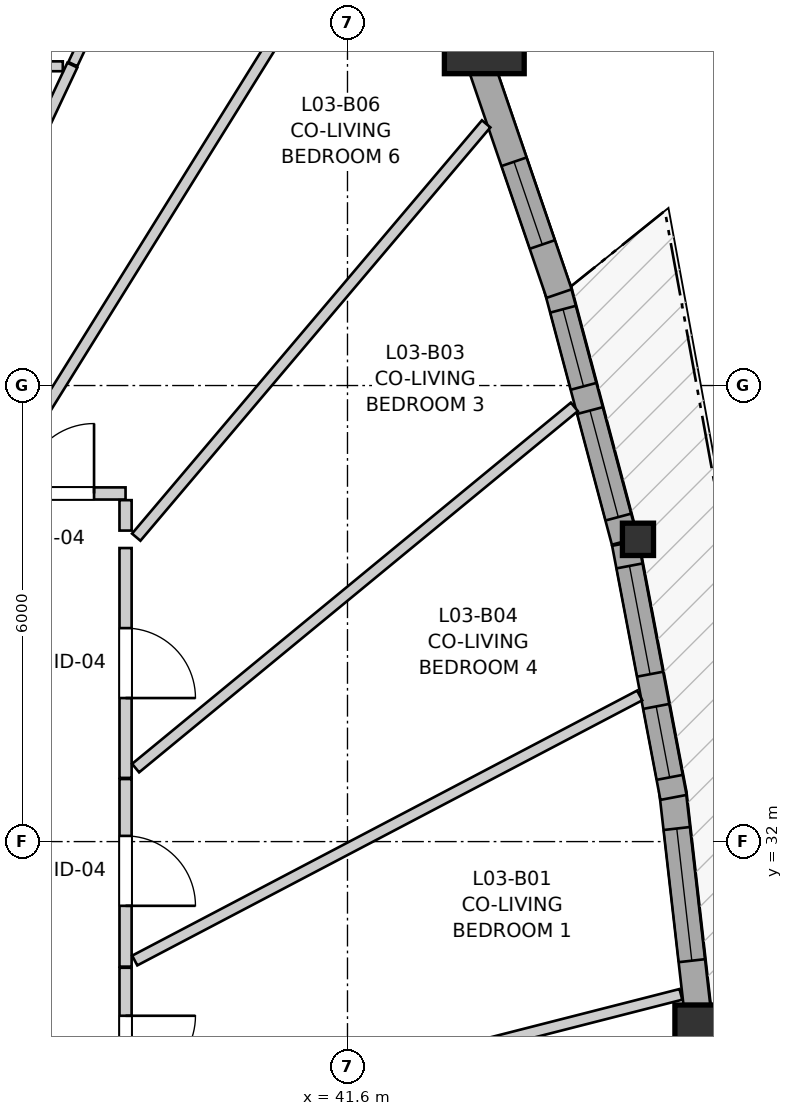
"""IFC4 building model, lengths in metres.
Left out: names, types, materials, properties, quantities, classifications, styles, units other than length and angle.
Written with IfcOpenShell. Run it as: python <this file> out.ifc"""

import sys

from ifc_helpers import new_model, si_unit, direction, frame, frame_2d, origin, origin_2d, place, context, subcontext, project, spatial, rectangle, i_section, extrude, source, transform, mapped, element, fill, save


model = new_model("IFC4")
c1 = context("Model", 3, precision=1e-05, world=origin(), true_north=direction((0.0, 1.0)))
c2 = subcontext(c1, "Body", "Model", "MODEL_VIEW")
j1 = project(units=[si_unit("LENGTHUNIT", "METRE"), si_unit("PLANEANGLEUNIT", "RADIAN")], contexts=[c1])
p1 = place(None, origin())
s1 = spatial("IfcSite", under=j1, at=p1, CompositionType="ELEMENT")
p2 = place(p1, origin())
s2 = spatial("IfcBuilding", under=s1, at=p2, CompositionType="ELEMENT")
p3 = place(p2, frame((0.0, 0.0, 14.2)))
s3 = spatial("IfcBuildingStorey", under=s2, at=p3, CompositionType="ELEMENT", Elevation=14.2)
m1 = source(origin(), c2, "Body", "SweptSolid", [
    extrude(rectangle(XDim=1.05, YDim=1.05, at=origin_2d()), origin(), (0.0, 0.0, 1.0), 2.94),
])
p4 = place(p3, frame((46.433, 29.325, 0.0), z_axis=(0.0, 0.0, 1.0), x_axis=(1.0, 0.0, 0.0)))
e1 = element("IfcColumn", 1, at=p4, inside=s3, PredefinedType="COLUMN", context=c2, shape_type="MappedRepresentation", body=[
    mapped(m1, transform((0.0, 0.0, 0.0), x_axis=(1.0, 0.0, 0.0), y_axis=(0.0, 1.0, 0.0), z_axis=(0.0, 0.0, 1.0), scale=1.0)),
])
m2 = source(origin(), c2, "Body", "SweptSolid", [
    extrude(i_section(OverallWidth=0.409, OverallDepth=0.425, WebThickness=0.03, FlangeThickness=0.048, FilletRadius=0.015, at=origin_2d()), origin(), (0.0, 0.0, 1.0), 2.94),
])
p5 = place(p3, frame((45.422, 35.977, 0.0), z_axis=(0.0, 0.0, 1.0), x_axis=(1.0, 0.0, 0.0)))
e2 = element("IfcColumn", 2, at=p5, inside=s3, PredefinedType="PILASTER", context=c2, shape_type="MappedRepresentation", body=[
    mapped(m2, transform((0.0, 0.0, 0.0), x_axis=(1.0, 0.0, 0.0), y_axis=(0.0, 1.0, 0.0), z_axis=(0.0, 0.0, 1.0), scale=1.0)),
])
p6 = place(p3, frame((43.4, 42.628, 0.0), z_axis=(0.0, 0.0, 1.0), x_axis=(1.0, 0.0, 0.0)))
e3 = element("IfcColumn", 3, at=p6, inside=s3, PredefinedType="COLUMN", context=c2, shape_type="MappedRepresentation", body=[
    mapped(m1, transform((0.0, 0.0, 0.0), x_axis=(1.0, 0.0, 0.0), y_axis=(0.0, 1.0, 0.0), z_axis=(0.0, 0.0, 1.0), scale=1.0)),
])
p7 = place(p3, frame((46.225, 29.604, 0.0), z_axis=(0.0, 0.0, 1.0), x_axis=(-0.113323399269, 0.993558154905, 0.0)))
e4 = element("IfcWall", 4, at=p7, inside=s3, PredefinedType="SOLIDWALL", context=c2, shape_type="SweptSolid", body=[
    extrude(rectangle(XDim=3.085, YDim=0.35, at=frame_2d((1.542, 0.0))), origin(), (0.0, 0.0, 1.0), 2.42),
])
p8 = place(p7, frame((0.835, 0.0, 0.82)))
e5 = element("IfcOpeningElement", 5, at=p8, cuts=e4, PredefinedType="OPENING", context=c2, shape_type="SweptSolid", body=[
    extrude(rectangle(XDim=1.75, YDim=1.3, at=frame_2d((0.875, 0.65))), frame((0.0, 0.185, 0.0), z_axis=(0.0, -1.0, 0.0), x_axis=(1.0, 0.0, 0.0)), (0.0, 0.0, 1.0), 0.37),
])
p9 = place(p3, frame((45.889, 32.581, 0.0), z_axis=(0.0, 0.0, 1.0), x_axis=(-0.186670339622, 0.98242260983, 0.0)))
e6 = element("IfcWall", 6, at=p9, inside=s3, PredefinedType="SOLIDWALL", context=c2, shape_type="SweptSolid", body=[
    extrude(rectangle(XDim=3.403, YDim=0.35, at=frame_2d((1.702, 0.0))), origin(), (0.0, 0.0, 1.0), 2.42),
])
p10 = place(p9, frame((0.269, 0.0, 0.82)))
e7 = element("IfcOpeningElement", 7, at=p10, cuts=e6, PredefinedType="OPENING", context=c2, shape_type="SweptSolid", body=[
    extrude(rectangle(XDim=0.95, YDim=1.35, at=frame_2d((0.475, 0.675))), frame((0.0, 0.185, 0.0), z_axis=(0.0, -1.0, 0.0), x_axis=(1.0, 0.0, 0.0)), (0.0, 0.0, 1.0), 0.37),
])
p11 = place(p9, frame((1.65, 0.0, 0.82)))
e8 = element("IfcOpeningElement", 8, at=p11, cuts=e6, PredefinedType="OPENING", context=c2, shape_type="SweptSolid", body=[
    extrude(rectangle(XDim=1.45, YDim=1.25, at=frame_2d((0.725, 0.625))), frame((0.0, 0.185, 0.0), z_axis=(0.0, -1.0, 0.0), x_axis=(1.0, 0.0, 0.0)), (0.0, 0.0, 1.0), 0.37),
])
p12 = place(p3, frame((45.248, 35.951, 0.0), z_axis=(0.0, 0.0, 1.0), x_axis=(-0.25703883136, 0.966401075731, 0.0)))
e9 = element("IfcWall", 9, at=p12, inside=s3, PredefinedType="SOLIDWALL", context=c2, shape_type="SweptSolid", body=[
    extrude(rectangle(XDim=3.459, YDim=0.35, at=frame_2d((1.729, 0.0))), origin(), (0.0, 0.0, 1.0), 2.42),
])
p13 = place(p12, frame((0.329, 0.0, 0.82)))
e10 = element("IfcOpeningElement", 10, at=p13, cuts=e9, PredefinedType="OPENING", context=c2, shape_type="SweptSolid", body=[
    extrude(rectangle(XDim=1.45, YDim=1.25, at=frame_2d((0.725, 0.625))), frame((0.0, 0.185, 0.0), z_axis=(0.0, -1.0, 0.0), x_axis=(1.0, 0.0, 0.0)), (0.0, 0.0, 1.0), 0.37),
])
p14 = place(p12, frame((2.109, 0.0, 0.82)))
e11 = element("IfcOpeningElement", 11, at=p14, cuts=e9, PredefinedType="OPENING", context=c2, shape_type="SweptSolid", body=[
    extrude(rectangle(XDim=1.05, YDim=1.45, at=frame_2d((0.525, 0.725))), frame((0.0, 0.185, 0.0), z_axis=(0.0, -1.0, 0.0), x_axis=(1.0, 0.0, 0.0)), (0.0, 0.0, 1.0), 0.37),
])
p15 = place(p3, frame((44.384, 39.21, 0.0), z_axis=(0.0, 0.0, 1.0), x_axis=(-0.323604561993, 0.946192415663, 0.0)))
e12 = element("IfcWall", 12, at=p15, inside=s3, PredefinedType="SOLIDWALL", context=c2, shape_type="SweptSolid", body=[
    extrude(rectangle(XDim=3.252, YDim=0.35, at=frame_2d((1.626, 0.0))), origin(), (0.0, 0.0, 1.0), 2.42),
])
p16 = place(p15, frame((0.683, 0.0, 0.82)))
e13 = element("IfcOpeningElement", 13, at=p16, cuts=e12, PredefinedType="OPENING", context=c2, shape_type="SweptSolid", body=[
    extrude(rectangle(XDim=1.15, YDim=1.2, at=frame_2d((0.575, 0.6))), frame((0.0, 0.185, 0.0), z_axis=(0.0, -1.0, 0.0), x_axis=(1.0, 0.0, 0.0)), (0.0, 0.0, 1.0), 0.37),
])
p17 = place(p3, frame((38.68, 35.862, 0.0), z_axis=(0.0, 0.0, 1.0), x_axis=(0.0, -1.0, 0.0)))
e14 = element("IfcWall", 14, at=p17, inside=s3, PredefinedType="PARTITIONING", context=c2, shape_type="SweptSolid", body=[
    extrude(rectangle(XDim=3.024, YDim=0.16, at=frame_2d((1.512, 0.0))), origin(), (0.0, 0.0, 1.0), 2.94),
])
p18 = place(p17, frame((1.053, 0.0, 0.0)))
e15 = element("IfcOpeningElement", 15, at=p18, cuts=e14, PredefinedType="OPENING", context=c2, shape_type="SweptSolid", body=[
    extrude(rectangle(XDim=0.92, YDim=2.1, at=frame_2d((0.46, 1.05))), frame((0.0, 0.09, 0.0), z_axis=(0.0, -1.0, 0.0), x_axis=(1.0, 0.0, 0.0)), (0.0, 0.0, 1.0), 0.18),
])
p19 = place(p3, frame((38.68, 32.823, 0.0), z_axis=(0.0, 0.0, 1.0), x_axis=(0.0, -1.0, 0.0)))
e16 = element("IfcWall", 16, at=p19, inside=s3, PredefinedType="PARTITIONING", context=c2, shape_type="SweptSolid", body=[
    extrude(rectangle(XDim=2.468, YDim=0.16, at=frame_2d((1.234, 0.0))), origin(), (0.0, 0.0, 1.0), 2.94),
])
p20 = place(p19, frame((0.748, 0.0, 0.0)))
e17 = element("IfcOpeningElement", 17, at=p20, cuts=e16, PredefinedType="OPENING", context=c2, shape_type="SweptSolid", body=[
    extrude(rectangle(XDim=0.92, YDim=2.1, at=frame_2d((0.46, 1.05))), frame((0.0, 0.09, 0.0), z_axis=(0.0, -1.0, 0.0), x_axis=(1.0, 0.0, 0.0)), (0.0, 0.0, 1.0), 0.18),
])
p21 = place(p3, frame((38.68, 30.34, 0.0), z_axis=(0.0, 0.0, 1.0), x_axis=(0.0, -1.0, 0.0)))
e18 = element("IfcWall", 18, at=p21, inside=s3, PredefinedType="PARTITIONING", context=c2, shape_type="SweptSolid", body=[
    extrude(rectangle(XDim=2.23, YDim=0.16, at=frame_2d((1.115, 0.0))), origin(), (0.0, 0.0, 1.0), 2.94),
])
p22 = place(p21, frame((0.632, 0.0, 0.0)))
e19 = element("IfcOpeningElement", 19, at=p22, cuts=e18, PredefinedType="OPENING", context=c2, shape_type="SweptSolid", body=[
    extrude(rectangle(XDim=0.92, YDim=2.1, at=frame_2d((0.46, 1.05))), frame((0.0, 0.09, 0.0), z_axis=(0.0, -1.0, 0.0), x_axis=(1.0, 0.0, 0.0)), (0.0, 0.0, 1.0), 0.18),
])
p23 = place(p3, frame((36.913, 36.58, 0.0), z_axis=(0.0, 0.0, 1.0), x_axis=(1.0, 0.0, 0.0)))
e20 = element("IfcWall", 20, at=p23, inside=s3, PredefinedType="PARTITIONING", context=c2, shape_type="SweptSolid", body=[
    extrude(rectangle(XDim=1.767, YDim=0.16, at=frame_2d((0.883, 0.0))), origin(), (0.0, 0.0, 1.0), 2.94),
])
p24 = place(p23, frame((0.433, 0.0, 0.0)))
e21 = element("IfcOpeningElement", 21, at=p24, cuts=e20, PredefinedType="OPENING", context=c2, shape_type="SweptSolid", body=[
    extrude(rectangle(XDim=0.92, YDim=2.1, at=frame_2d((0.46, 1.05))), frame((0.0, 0.09, 0.0), z_axis=(0.0, -1.0, 0.0), x_axis=(1.0, 0.0, 0.0)), (0.0, 0.0, 1.0), 0.18),
])
p25 = place(p3, frame((37.009, 36.705, 0.0), z_axis=(0.0, 0.0, 1.0), x_axis=(0.528183829193, 0.849130050451, 0.0)))
e22 = element("IfcWall", 22, at=p25, inside=s3, PredefinedType="PARTITIONING", context=c2, shape_type="SweptSolid", body=[
    extrude(rectangle(XDim=10.005, YDim=0.145, at=frame_2d((5.003, 0.0))), origin(), (0.0, 0.0, 1.0), 2.94),
])
p26 = place(p3, frame((38.812, 32.967, 0.0), z_axis=(0.0, 0.0, 1.0), x_axis=(0.772048037558, 0.635564180633, 0.0)))
e23 = element("IfcWall", 23, at=p26, inside=s3, PredefinedType="PARTITIONING", context=c2, shape_type="SweptSolid", body=[
    extrude(rectangle(XDim=7.477, YDim=0.145, at=frame_2d((3.739, 0.0))), origin(), (0.0, 0.0, 1.0), 2.94),
])
p27 = place(p3, frame((38.801, 30.435, 0.0), z_axis=(0.0, 0.0, 1.0), x_axis=(0.885428701358, 0.46477523042, 0.0)))
e24 = element("IfcWall", 24, at=p27, inside=s3, PredefinedType="PARTITIONING", context=c2, shape_type="SweptSolid", body=[
    extrude(rectangle(XDim=7.503, YDim=0.145, at=frame_2d((3.751, 0.0))), origin(), (0.0, 0.0, 1.0), 2.94),
])
p28 = place(p3, frame((38.786, 28.152, 0.0), z_axis=(0.0, 0.0, 1.0), x_axis=(0.968940490632, 0.247294006424, 0.0)))
e25 = element("IfcWall", 25, at=p28, inside=s3, PredefinedType="PARTITIONING", context=c2, shape_type="SweptSolid", body=[
    extrude(rectangle(XDim=7.432, YDim=0.145, at=frame_2d((3.716, 0.0))), origin(), (0.0, 0.0, 1.0), 2.94),
])
p29 = place(p3, frame((38.821, 36.005, 0.0), z_axis=(0.0, 0.0, 1.0), x_axis=(0.646174151972, 0.76318999294, 0.0)))
e26 = element("IfcWall", 26, at=p29, inside=s3, PredefinedType="PARTITIONING", context=c2, shape_type="SweptSolid", body=[
    extrude(rectangle(XDim=7.125, YDim=0.145, at=frame_2d((3.562, 0.0))), origin(), (0.0, 0.0, 1.0), 2.94),
])
p30 = place(p3, frame((35.385, 36.698, 0.0), z_axis=(0.0, 0.0, 1.0), x_axis=(0.425687116038, 0.904870421242, 0.0)))
e27 = element("IfcWall", 27, at=p30, inside=s3, PredefinedType="PARTITIONING", context=c2, shape_type="SweptSolid", body=[
    extrude(rectangle(XDim=6.097, YDim=0.145, at=frame_2d((3.049, 0.0))), origin(), (0.0, 0.0, 1.0), 2.94),
])
p31 = place(p3, frame((37.987, 42.229, 0.0), z_axis=(0.0, 0.0, 1.0), x_axis=(0.425771690569, 0.904830629184, 0.0)))
e28 = element("IfcWall", 28, at=p31, inside=s3, PredefinedType="PARTITIONING", context=c2, shape_type="SweptSolid", body=[
    extrude(rectangle(XDim=1.855, YDim=0.13, at=frame_2d((0.928, 0.0))), origin(), (0.0, 0.0, 1.0), 2.94),
])
p32 = place(p3, frame((37.071, 42.2, 0.0), z_axis=(0.0, 0.0, 1.0), x_axis=(1.0, 0.0, 0.0)))
e29 = element("IfcWall", 29, at=p32, inside=s3, PredefinedType="PARTITIONING", context=c2, shape_type="SweptSolid", body=[
    extrude(rectangle(XDim=0.783, YDim=0.13, at=frame_2d((0.392, 0.0))), origin(), (0.0, 0.0, 1.0), 2.94),
])
p33 = place(p3, frame((38.68, 36.092, 0.0), z_axis=(0.0, 0.0, 1.0), x_axis=(0.0, 1.0, 0.0)))
e30 = element("IfcWall", 30, at=p33, inside=s3, PredefinedType="PARTITIONING", context=c2, shape_type="SweptSolid", body=[
    extrude(rectangle(XDim=0.4, YDim=0.16, at=frame_2d((0.2, 0.0))), origin(), (0.0, 0.0, 1.0), 2.94),
])
m3 = source(origin(), c2, "Body", "SweptSolid", [
    extrude(rectangle(XDim=1.75, YDim=1.3, at=frame_2d((0.875, 0.65))), frame((0.0, 0.03, 0.0), z_axis=(0.0, -1.0, 0.0), x_axis=(1.0, 0.0, 0.0)), (0.0, 0.0, 1.0), 0.06),
])
p34 = place(p8, origin())
e31 = element("IfcWindow", 31, at=p34, inside=s3, PartitioningType="SINGLE_PANEL", PredefinedType="WINDOW", context=c2, shape_type="MappedRepresentation", body=[
    mapped(m3, transform((0.0, 0.0, 0.0), x_axis=(1.0, 0.0, 0.0), y_axis=(0.0, 1.0, 0.0), z_axis=(0.0, 0.0, 1.0), scale=1.0)),
])
fill(e5, e31)
m4 = source(origin(), c2, "Body", "SweptSolid", [
    extrude(rectangle(XDim=0.95, YDim=1.35, at=frame_2d((0.475, 0.675))), frame((0.0, 0.03, 0.0), z_axis=(0.0, -1.0, 0.0), x_axis=(1.0, 0.0, 0.0)), (0.0, 0.0, 1.0), 0.06),
])
p35 = place(p10, origin())
e32 = element("IfcWindow", 32, at=p35, inside=s3, PartitioningType="SINGLE_PANEL", PredefinedType="WINDOW", context=c2, shape_type="MappedRepresentation", body=[
    mapped(m4, transform((0.0, 0.0, 0.0), x_axis=(1.0, 0.0, 0.0), y_axis=(0.0, 1.0, 0.0), z_axis=(0.0, 0.0, 1.0), scale=1.0)),
])
fill(e7, e32)
m5 = source(origin(), c2, "Body", "SweptSolid", [
    extrude(rectangle(XDim=1.45, YDim=1.25, at=frame_2d((0.725, 0.625))), frame((0.0, 0.03, 0.0), z_axis=(0.0, -1.0, 0.0), x_axis=(1.0, 0.0, 0.0)), (0.0, 0.0, 1.0), 0.06),
])
p36 = place(p11, origin())
e33 = element("IfcWindow", 33, at=p36, inside=s3, PartitioningType="SINGLE_PANEL", PredefinedType="WINDOW", context=c2, shape_type="MappedRepresentation", body=[
    mapped(m5, transform((0.0, 0.0, 0.0), x_axis=(1.0, 0.0, 0.0), y_axis=(0.0, 1.0, 0.0), z_axis=(0.0, 0.0, 1.0), scale=1.0)),
])
fill(e8, e33)
p37 = place(p13, origin())
e34 = element("IfcWindow", 34, at=p37, inside=s3, PartitioningType="SINGLE_PANEL", PredefinedType="WINDOW", context=c2, shape_type="MappedRepresentation", body=[
    mapped(m5, transform((0.0, 0.0, 0.0), x_axis=(1.0, 0.0, 0.0), y_axis=(0.0, 1.0, 0.0), z_axis=(0.0, 0.0, 1.0), scale=1.0)),
])
fill(e10, e34)
m6 = source(origin(), c2, "Body", "SweptSolid", [
    extrude(rectangle(XDim=1.05, YDim=1.45, at=frame_2d((0.525, 0.725))), frame((0.0, 0.03, 0.0), z_axis=(0.0, -1.0, 0.0), x_axis=(1.0, 0.0, 0.0)), (0.0, 0.0, 1.0), 0.06),
])
p38 = place(p14, origin())
e35 = element("IfcWindow", 35, at=p38, inside=s3, PartitioningType="SINGLE_PANEL", PredefinedType="WINDOW", context=c2, shape_type="MappedRepresentation", body=[
    mapped(m6, transform((0.0, 0.0, 0.0), x_axis=(1.0, 0.0, 0.0), y_axis=(0.0, 1.0, 0.0), z_axis=(0.0, 0.0, 1.0), scale=1.0)),
])
fill(e11, e35)
m7 = source(origin(), c2, "Body", "SweptSolid", [
    extrude(rectangle(XDim=1.15, YDim=1.2, at=frame_2d((0.575, 0.6))), frame((0.0, 0.03, 0.0), z_axis=(0.0, -1.0, 0.0), x_axis=(1.0, 0.0, 0.0)), (0.0, 0.0, 1.0), 0.06),
])
p39 = place(p16, origin())
e36 = element("IfcWindow", 36, at=p39, inside=s3, PartitioningType="SINGLE_PANEL", PredefinedType="WINDOW", context=c2, shape_type="MappedRepresentation", body=[
    mapped(m7, transform((0.0, 0.0, 0.0), x_axis=(1.0, 0.0, 0.0), y_axis=(0.0, 1.0, 0.0), z_axis=(0.0, 0.0, 1.0), scale=1.0)),
])
fill(e13, e36)
m8 = source(origin(), c2, "Body", "SweptSolid", [
    extrude(rectangle(XDim=0.92, YDim=2.1, at=frame_2d((0.46, 1.05))), frame((0.0, 0.025, 0.0), z_axis=(0.0, -1.0, 0.0), x_axis=(1.0, 0.0, 0.0)), (0.0, 0.0, 1.0), 0.05),
])
p40 = place(p18, origin())
e37 = element("IfcDoor", 37, at=p40, inside=s3, OperationType="SINGLE_SWING_RIGHT", PredefinedType="DOOR", context=c2, shape_type="MappedRepresentation", body=[
    mapped(m8, transform((0.0, 0.0, 0.0), x_axis=(1.0, 0.0, 0.0), y_axis=(0.0, 1.0, 0.0), z_axis=(0.0, 0.0, 1.0), scale=1.0)),
])
fill(e15, e37)
p41 = place(p20, origin())
e38 = element("IfcDoor", 38, at=p41, inside=s3, OperationType="SINGLE_SWING_RIGHT", PredefinedType="DOOR", context=c2, shape_type="MappedRepresentation", body=[
    mapped(m8, transform((0.0, 0.0, 0.0), x_axis=(1.0, 0.0, 0.0), y_axis=(0.0, 1.0, 0.0), z_axis=(0.0, 0.0, 1.0), scale=1.0)),
])
fill(e17, e38)
p42 = place(p22, origin())
e39 = element("IfcDoor", 39, at=p42, inside=s3, OperationType="SINGLE_SWING_LEFT", PredefinedType="DOOR", context=c2, shape_type="MappedRepresentation", body=[
    mapped(m8, transform((0.0, 0.0, 0.0), x_axis=(1.0, 0.0, 0.0), y_axis=(0.0, 1.0, 0.0), z_axis=(0.0, 0.0, 1.0), scale=1.0)),
])
fill(e19, e39)
p43 = place(p24, origin())
e40 = element("IfcDoor", 40, at=p43, inside=s3, OperationType="SINGLE_SWING_RIGHT", PredefinedType="DOOR", context=c2, shape_type="MappedRepresentation", body=[
    mapped(m8, transform((0.0, 0.0, 0.0), x_axis=(1.0, 0.0, 0.0), y_axis=(0.0, 1.0, 0.0), z_axis=(0.0, 0.0, 1.0), scale=1.0)),
])
fill(e21, e40)
save(model, sys.argv[1])
